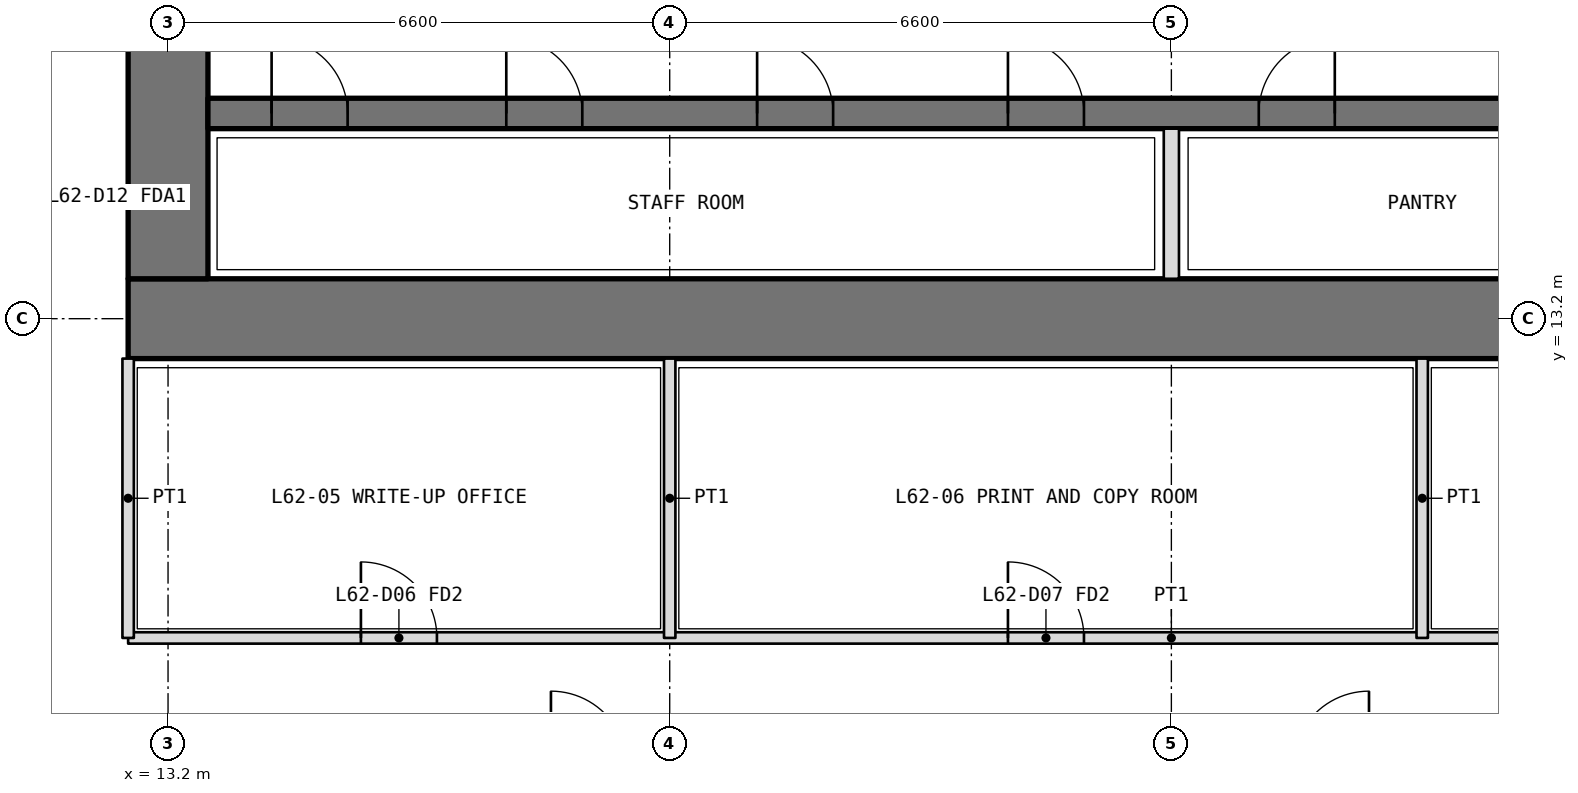
"""IFC4 building model, lengths in metres.
Left out: names, types, materials, properties, quantities, classifications, styles, units other than length and angle.
Written with IfcOpenShell. Run it as: python <this file> out.ifc"""

import sys

from ifc_helpers import new_model, si_unit, direction, frame, frame_2d, origin, place, context, subcontext, project, spatial, rectangle, extrude, element, fill, save


model = new_model("IFC4")
c1 = context("Model", 3, precision=1e-05, world=origin(), true_north=direction((0.0, 1.0)))
c2 = subcontext(c1, "Body", "Model", "MODEL_VIEW")
j1 = project(units=[si_unit("LENGTHUNIT", "METRE"), si_unit("PLANEANGLEUNIT", "RADIAN")], contexts=[c1])
p1 = place(None, origin())
s1 = spatial("IfcSite", under=j1, at=p1, CompositionType="ELEMENT")
p2 = place(p1, origin())
s2 = spatial("IfcBuilding", under=s1, at=p2, CompositionType="ELEMENT")
p3 = place(p2, frame((0.0, 0.0, 271.2)))
s3 = spatial("IfcBuildingStorey", under=s2, at=p3, CompositionType="ELEMENT", Elevation=271.2)
p4 = place(p3, frame((12.675, 13.2, 0.0), z_axis=(0.0, 0.0, 1.0), x_axis=(1.0, 0.0, 0.0)))
e1 = element("IfcWall", 1, at=p4, inside=s3, PredefinedType="SHEAR", context=c2, shape_type="SweptSolid", body=[
    extrude(rectangle(XDim=27.45, YDim=1.05, at=frame_2d((13.725, 0.0))), origin(), (0.0, 0.0, 1.0), 4.2),
])
p5 = place(p3, frame((13.2, 32.475, 0.0), z_axis=(0.0, 0.0, 1.0), x_axis=(0.0, -1.0, 0.0)))
e2 = element("IfcWall", 2, at=p5, inside=s3, PredefinedType="SHEAR", context=c2, shape_type="SweptSolid", body=[
    extrude(rectangle(XDim=18.75, YDim=1.05, at=frame_2d((9.375, 0.0))), origin(), (0.0, 0.0, 1.0), 4.2),
])
p6 = place(p5, frame((14.125, 0.0, 0.0)))
e3 = element("IfcOpeningElement", 3, at=p6, cuts=e2, PredefinedType="OPENING", context=c2, shape_type="SweptSolid", body=[
    extrude(rectangle(XDim=1.6, YDim=2.1, at=frame_2d((0.8, 1.05))), frame((0.0, 0.535, 0.0), z_axis=(0.0, -1.0, 0.0), x_axis=(1.0, 0.0, 0.0)), (0.0, 0.0, 1.0), 1.07),
])
p7 = place(p5, frame((3.325, 0.0, 0.0)))
e4 = element("IfcOpeningElement", 4, at=p7, cuts=e2, PredefinedType="OPENING", context=c2, shape_type="SweptSolid", body=[
    extrude(rectangle(XDim=1.6, YDim=2.1, at=frame_2d((0.8, 1.05))), frame((0.0, 0.535, 0.0), z_axis=(0.0, -1.0, 0.0), x_axis=(1.0, 0.0, 0.0)), (0.0, 0.0, 1.0), 1.07),
])
p8 = place(p3, frame((13.725, 15.9, 0.0), z_axis=(0.0, 0.0, 1.0), x_axis=(1.0, 0.0, 0.0)))
e5 = element("IfcWall", 5, at=p8, inside=s3, PredefinedType="SHEAR", context=c2, shape_type="SweptSolid", body=[
    extrude(rectangle(XDim=25.35, YDim=0.4, at=frame_2d((12.675, 0.0))), origin(), (0.0, 0.0, 1.0), 4.2),
])
p9 = place(p8, frame((0.837, 0.0, 0.0)))
e6 = element("IfcOpeningElement", 6, at=p9, cuts=e5, PredefinedType="OPENING", context=c2, shape_type="SweptSolid", body=[
    extrude(rectangle(XDim=1.0, YDim=2.1, at=frame_2d((0.5, 1.05))), frame((0.0, 0.21, 0.0), z_axis=(0.0, -1.0, 0.0), x_axis=(1.0, 0.0, 0.0)), (0.0, 0.0, 1.0), 0.42),
])
p10 = place(p8, frame((3.925, 0.0, 0.0)))
e7 = element("IfcOpeningElement", 7, at=p10, cuts=e5, PredefinedType="OPENING", context=c2, shape_type="SweptSolid", body=[
    extrude(rectangle(XDim=1.0, YDim=2.1, at=frame_2d((0.5, 1.05))), frame((0.0, 0.21, 0.0), z_axis=(0.0, -1.0, 0.0), x_axis=(1.0, 0.0, 0.0)), (0.0, 0.0, 1.0), 0.42),
])
p11 = place(p8, frame((7.225, 0.0, 0.0)))
e8 = element("IfcOpeningElement", 8, at=p11, cuts=e5, PredefinedType="OPENING", context=c2, shape_type="SweptSolid", body=[
    extrude(rectangle(XDim=1.0, YDim=2.1, at=frame_2d((0.5, 1.05))), frame((0.0, 0.21, 0.0), z_axis=(0.0, -1.0, 0.0), x_axis=(1.0, 0.0, 0.0)), (0.0, 0.0, 1.0), 0.42),
])
p12 = place(p8, frame((10.525, 0.0, 0.0)))
e9 = element("IfcOpeningElement", 9, at=p12, cuts=e5, PredefinedType="OPENING", context=c2, shape_type="SweptSolid", body=[
    extrude(rectangle(XDim=1.0, YDim=2.1, at=frame_2d((0.5, 1.05))), frame((0.0, 0.21, 0.0), z_axis=(0.0, -1.0, 0.0), x_axis=(1.0, 0.0, 0.0)), (0.0, 0.0, 1.0), 0.42),
])
p13 = place(p8, frame((13.825, 0.0, 0.0)))
e10 = element("IfcOpeningElement", 10, at=p13, cuts=e5, PredefinedType="OPENING", context=c2, shape_type="SweptSolid", body=[
    extrude(rectangle(XDim=1.0, YDim=2.1, at=frame_2d((0.5, 1.05))), frame((0.0, 0.21, 0.0), z_axis=(0.0, -1.0, 0.0), x_axis=(1.0, 0.0, 0.0)), (0.0, 0.0, 1.0), 0.42),
])
p14 = place(p8, frame((17.125, 0.0, 0.0)))
e11 = element("IfcOpeningElement", 11, at=p14, cuts=e5, PredefinedType="OPENING", context=c2, shape_type="SweptSolid", body=[
    extrude(rectangle(XDim=1.0, YDim=2.1, at=frame_2d((0.5, 1.05))), frame((0.0, 0.21, 0.0), z_axis=(0.0, -1.0, 0.0), x_axis=(1.0, 0.0, 0.0)), (0.0, 0.0, 1.0), 0.42),
])
p15 = place(p8, frame((20.425, 0.0, 0.0)))
e12 = element("IfcOpeningElement", 12, at=p15, cuts=e5, PredefinedType="OPENING", context=c2, shape_type="SweptSolid", body=[
    extrude(rectangle(XDim=1.0, YDim=2.1, at=frame_2d((0.5, 1.05))), frame((0.0, 0.21, 0.0), z_axis=(0.0, -1.0, 0.0), x_axis=(1.0, 0.0, 0.0)), (0.0, 0.0, 1.0), 0.42),
])
p16 = place(p8, frame((23.512, 0.0, 0.0)))
e13 = element("IfcOpeningElement", 13, at=p16, cuts=e5, PredefinedType="OPENING", context=c2, shape_type="SweptSolid", body=[
    extrude(rectangle(XDim=1.0, YDim=2.1, at=frame_2d((0.5, 1.05))), frame((0.0, 0.21, 0.0), z_axis=(0.0, -1.0, 0.0), x_axis=(1.0, 0.0, 0.0)), (0.0, 0.0, 1.0), 0.42),
])
p17 = place(p3, frame((26.4, 13.725, 0.0), z_axis=(0.0, 0.0, 1.0), x_axis=(0.0, 1.0, 0.0)))
e14 = element("IfcWall", 14, at=p17, inside=s3, PredefinedType="PARTITIONING", context=c2, shape_type="SweptSolid", body=[
    extrude(rectangle(XDim=1.975, YDim=0.2, at=frame_2d((0.987, 0.0))), origin(), (0.0, 0.0, 1.0), 4.2),
])
p18 = place(p3, frame((12.675, 9.0, 0.0), z_axis=(0.0, 0.0, 1.0), x_axis=(1.0, 0.0, 0.0)))
e15 = element("IfcWall", 15, at=p18, inside=s3, PredefinedType="PARTITIONING", context=c2, shape_type="SweptSolid", body=[
    extrude(rectangle(XDim=27.45, YDim=0.15, at=frame_2d((13.725, 0.0))), origin(), (0.0, 0.0, 1.0), 3.0),
])
p19 = place(p18, frame((3.062, 0.0, 0.0)))
e16 = element("IfcOpeningElement", 16, at=p19, cuts=e15, PredefinedType="OPENING", context=c2, shape_type="SweptSolid", body=[
    extrude(rectangle(XDim=1.0, YDim=2.1, at=frame_2d((0.5, 1.05))), frame((0.0, 0.085, 0.0), z_axis=(0.0, -1.0, 0.0), x_axis=(1.0, 0.0, 0.0)), (0.0, 0.0, 1.0), 0.17),
])
p20 = place(p18, frame((11.575, 0.0, 0.0)))
e17 = element("IfcOpeningElement", 17, at=p20, cuts=e15, PredefinedType="OPENING", context=c2, shape_type="SweptSolid", body=[
    extrude(rectangle(XDim=1.0, YDim=2.1, at=frame_2d((0.5, 1.05))), frame((0.0, 0.085, 0.0), z_axis=(0.0, -1.0, 0.0), x_axis=(1.0, 0.0, 0.0)), (0.0, 0.0, 1.0), 0.17),
])
p21 = place(p18, frame((19.825, 0.0, 0.0)))
e18 = element("IfcOpeningElement", 18, at=p21, cuts=e15, PredefinedType="OPENING", context=c2, shape_type="SweptSolid", body=[
    extrude(rectangle(XDim=1.0, YDim=2.1, at=frame_2d((0.5, 1.05))), frame((0.0, 0.085, 0.0), z_axis=(0.0, -1.0, 0.0), x_axis=(1.0, 0.0, 0.0)), (0.0, 0.0, 1.0), 0.17),
])
p22 = place(p18, frame((25.038, 0.0, 0.0)))
e19 = element("IfcOpeningElement", 19, at=p22, cuts=e15, PredefinedType="OPENING", context=c2, shape_type="SweptSolid", body=[
    extrude(rectangle(XDim=1.0, YDim=2.1, at=frame_2d((0.5, 1.05))), frame((0.0, 0.085, 0.0), z_axis=(0.0, -1.0, 0.0), x_axis=(1.0, 0.0, 0.0)), (0.0, 0.0, 1.0), 0.17),
])
for number, where, z_axis, x_axis in (
    (20, (12.675, 12.675, 0.0), (0.0, 0.0, 1.0), (0.0, -1.0, 0.0)),
    (21, (19.8, 12.675, 0.0), (0.0, 0.0, 1.0), (0.0, -1.0, 0.0)),
):
    element("IfcWall", number, at=place(p3, frame(where, z_axis=z_axis, x_axis=x_axis)), inside=s3, PredefinedType="PARTITIONING", context=c2, shape_type="SweptSolid", body=[
        extrude(rectangle(XDim=3.675, YDim=0.15, at=frame_2d((1.837, 0.0))), origin(), (0.0, 0.0, 1.0), 3.0),
    ])
p23 = place(p3, frame((29.7, 12.675, 0.0), z_axis=(0.0, 0.0, 1.0), x_axis=(0.0, -1.0, 0.0)))
e22 = element("IfcWall", 22, at=p23, inside=s3, PredefinedType="PARTITIONING", context=c2, shape_type="SweptSolid", body=[
    extrude(rectangle(XDim=3.675, YDim=0.15, at=frame_2d((1.837, 0.0))), origin(), (0.0, 0.0, 1.0), 3.9),
])
p24 = place(p19, origin())
e23 = element("IfcDoor", 23, at=p24, inside=s3, OperationType="SINGLE_SWING_LEFT", PredefinedType="DOOR", context=c2, shape_type="SweptSolid", body=[
    extrude(rectangle(XDim=1.0, YDim=2.1, at=frame_2d((0.5, 1.05))), frame((0.0, 0.025, 0.0), z_axis=(0.0, -1.0, 0.0), x_axis=(1.0, 0.0, 0.0)), (0.0, 0.0, 1.0), 0.05),
])
fill(e16, e23)
p25 = place(p20, origin())
e24 = element("IfcDoor", 24, at=p25, inside=s3, OperationType="SINGLE_SWING_LEFT", PredefinedType="DOOR", context=c2, shape_type="SweptSolid", body=[
    extrude(rectangle(XDim=1.0, YDim=2.1, at=frame_2d((0.5, 1.05))), frame((0.0, 0.025, 0.0), z_axis=(0.0, -1.0, 0.0), x_axis=(1.0, 0.0, 0.0)), (0.0, 0.0, 1.0), 0.05),
])
fill(e17, e24)
p26 = place(p9, origin())
e25 = element("IfcDoor", 25, at=p26, inside=s3, OperationType="SINGLE_SWING_LEFT", PredefinedType="DOOR", context=c2, shape_type="SweptSolid", body=[
    extrude(rectangle(XDim=1.0, YDim=2.1, at=frame_2d((0.5, 1.05))), frame((0.0, 0.025, 0.0), z_axis=(0.0, -1.0, 0.0), x_axis=(1.0, 0.0, 0.0)), (0.0, 0.0, 1.0), 0.05),
])
fill(e6, e25)
p27 = place(p10, origin())
e26 = element("IfcDoor", 26, at=p27, inside=s3, OperationType="SINGLE_SWING_LEFT", PredefinedType="DOOR", context=c2, shape_type="SweptSolid", body=[
    extrude(rectangle(XDim=1.0, YDim=2.1, at=frame_2d((0.5, 1.05))), frame((0.0, 0.025, 0.0), z_axis=(0.0, -1.0, 0.0), x_axis=(1.0, 0.0, 0.0)), (0.0, 0.0, 1.0), 0.05),
])
fill(e7, e26)
p28 = place(p11, origin())
e27 = element("IfcDoor", 27, at=p28, inside=s3, OperationType="SINGLE_SWING_LEFT", PredefinedType="DOOR", context=c2, shape_type="SweptSolid", body=[
    extrude(rectangle(XDim=1.0, YDim=2.1, at=frame_2d((0.5, 1.05))), frame((0.0, 0.025, 0.0), z_axis=(0.0, -1.0, 0.0), x_axis=(1.0, 0.0, 0.0)), (0.0, 0.0, 1.0), 0.05),
])
fill(e8, e27)
p29 = place(p12, origin())
e28 = element("IfcDoor", 28, at=p29, inside=s3, OperationType="SINGLE_SWING_LEFT", PredefinedType="DOOR", context=c2, shape_type="SweptSolid", body=[
    extrude(rectangle(XDim=1.0, YDim=2.1, at=frame_2d((0.5, 1.05))), frame((0.0, 0.025, 0.0), z_axis=(0.0, -1.0, 0.0), x_axis=(1.0, 0.0, 0.0)), (0.0, 0.0, 1.0), 0.05),
])
fill(e9, e28)
p30 = place(p13, origin())
e29 = element("IfcDoor", 29, at=p30, inside=s3, OperationType="SINGLE_SWING_RIGHT", PredefinedType="DOOR", context=c2, shape_type="SweptSolid", body=[
    extrude(rectangle(XDim=1.0, YDim=2.1, at=frame_2d((0.5, 1.05))), frame((0.0, 0.025, 0.0), z_axis=(0.0, -1.0, 0.0), x_axis=(1.0, 0.0, 0.0)), (0.0, 0.0, 1.0), 0.05),
])
fill(e10, e29)
save(model, sys.argv[1])
